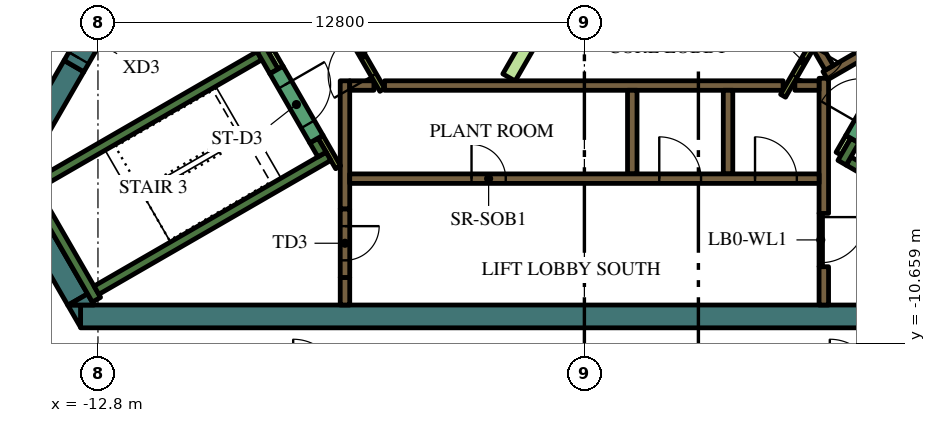
"""IFC4 building model, lengths in metres.
Left out: names, types, materials, properties, quantities, classifications, styles, units other than length and angle.
Written with IfcOpenShell. Run it as: python <this file> out.ifc"""

import sys

from ifc_helpers import new_model, si_unit, direction, frame, frame_2d, origin, place, context, subcontext, project, spatial, polyline, rectangle, outline, extrude, element, fill, save


model = new_model("IFC4")
c1 = context("Model", 3, precision=1e-05, world=origin(), true_north=direction((0.0, 1.0)))
c2 = subcontext(c1, "Body", "Model", "MODEL_VIEW")
j1 = project(units=[si_unit("LENGTHUNIT", "METRE"), si_unit("PLANEANGLEUNIT", "RADIAN")], contexts=[c1])
p1 = place(None, origin())
s1 = spatial("IfcSite", under=j1, at=p1, CompositionType="ELEMENT")
p2 = place(p1, origin())
s2 = spatial("IfcBuilding", under=s1, at=p2, CompositionType="ELEMENT")
p3 = place(p2, frame((0.0, 0.0, 336.0)))
s3 = spatial("IfcBuildingStorey", under=s2, at=p3, CompositionType="ELEMENT", Elevation=336.0)
p4 = place(p3, frame((8.904, -9.95, 0.0), z_axis=(0.0, 0.0, 1.0), x_axis=(-1.0, 0.0, 0.0)))
e1 = element("IfcWall", 1, at=p4, inside=s3, PredefinedType="SOLIDWALL", context=c2, shape_type="SweptSolid", body=[
    extrude(rectangle(XDim=22.161, YDim=0.6, at=frame_2d((11.081, 0.0))), origin(), (0.0, 0.0, 1.0), 4.2),
])
p5 = place(p3, origin())
e2 = element("IfcWall", 2, at=p5, inside=s3, PredefinedType="SOLIDWALL", context=c2, shape_type="SweptSolid", body=[
    extrude(outline(polyline([(-13.597, -9.65), (-13.259, -9.65), (-13.259, -10.236), (-13.597, -9.65)])), origin(), (0.0, 0.0, 1.0), 4.2),
])
p6 = place(p3, frame((-13.333, -9.506, 0.0), z_axis=(0.0, 0.0, 1.0), x_axis=(-0.500019073792, 0.866014391245, 0.0)))
e3 = element("IfcWall", 3, at=p6, inside=s3, PredefinedType="SOLIDWALL", context=c2, shape_type="SweptSolid", body=[
    extrude(rectangle(XDim=3.823, YDim=0.6, at=frame_2d((1.912, 0.0))), origin(), (0.0, 0.0, 1.0), 4.2),
])
e4 = element("IfcWall", 4, at=p5, inside=s3, PredefinedType="SOLIDWALL", context=c2, shape_type="SweptSolid", body=[
    extrude(outline(polyline([(-12.904, -9.65), (-13.58, -9.65), (-13.073, -9.357), (-12.904, -9.65)])), origin(), (0.0, 0.0, 1.0), 4.2),
])
p7 = place(p3, frame((-13.432, -3.364, 0.0), z_axis=(0.0, 0.0, 1.0), x_axis=(-0.499960127962, -0.866048422692, 0.0)))
e5 = element("IfcWall", 5, at=p7, inside=s3, PredefinedType="SOLIDWALL", context=c2, shape_type="SweptSolid", body=[
    extrude(rectangle(XDim=2.934, YDim=0.6, at=frame_2d((1.467, 0.0))), origin(), (0.0, 0.0, 1.0), 4.2),
])
p8 = place(p3, frame((12.84, -9.261, 0.0), z_axis=(0.0, 0.0, 1.0), x_axis=(-0.866013990052, 0.500019768644, 0.0)))
e6 = element("IfcWall", 6, at=p8, inside=s3, PredefinedType="SOLIDWALL", context=c2, shape_type="SweptSolid", body=[
    extrude(rectangle(XDim=6.8, YDim=0.25, at=frame_2d((3.4, 0.0))), origin(), (0.0, 0.0, 1.0), 4.2),
])
p9 = place(p3, frame((6.78, -5.906, 0.0), z_axis=(0.0, 0.0, 1.0), x_axis=(0.500223362819, 0.865896406789, 0.0)))
e7 = element("IfcWall", 7, at=p9, inside=s3, PredefinedType="SOLIDWALL", context=c2, shape_type="SweptSolid", body=[
    extrude(rectangle(XDim=0.675, YDim=0.25, at=frame_2d((0.337, 0.0))), origin(), (0.0, 0.0, 1.0), 4.2),
])
p10 = place(p3, frame((-12.84, -9.511, 0.0), z_axis=(0.0, 0.0, 1.0), x_axis=(-0.499997733992, 0.866026712061, 0.0)))
e8 = element("IfcWall", 8, at=p10, inside=s3, PredefinedType="SOLIDWALL", context=c2, shape_type="SweptSolid", body=[
    extrude(rectangle(XDim=3.634, YDim=0.25, at=frame_2d((1.817, 0.0))), origin(), (0.0, 0.0, 1.0), 4.2),
])
p11 = place(p3, frame((-14.44, -6.49, 0.0), z_axis=(0.0, 0.0, 1.0), x_axis=(0.866022966069, 0.500004222222, 0.0)))
e9 = element("IfcWall", 9, at=p11, inside=s3, PredefinedType="SOLIDWALL", context=c2, shape_type="SweptSolid", body=[
    extrude(rectangle(XDim=6.8, YDim=0.25, at=frame_2d((3.4, 0.0))), origin(), (0.0, 0.0, 1.0), 4.2),
])
p12 = place(p3, frame((-8.168, -3.503, 0.0), z_axis=(0.0, 0.0, 1.0), x_axis=(-0.499952099219, 0.866053057547, 0.0)))
e10 = element("IfcWall", 10, at=p12, inside=s3, PredefinedType="SOLIDWALL", context=c2, shape_type="SweptSolid", body=[
    extrude(rectangle(XDim=0.675, YDim=0.25, at=frame_2d((0.337, 0.0))), origin(), (0.0, 0.0, 1.0), 4.2),
])
p13 = place(p3, frame((-12.84, -9.261, 0.0), z_axis=(0.0, 0.0, 1.0), x_axis=(0.866016039709, 0.500016218704, 0.0)))
e11 = element("IfcWall", 11, at=p13, inside=s3, PredefinedType="SOLIDWALL", context=c2, shape_type="SweptSolid", body=[
    extrude(rectangle(XDim=7.05, YDim=0.25, at=frame_2d((3.525, 0.0))), origin(), (0.0, 0.0, 1.0), 4.2),
])
p14 = place(p3, frame((-6.905, -5.69, 0.0), z_axis=(0.0, 0.0, 1.0), x_axis=(-0.500402024738, 0.865793170242, 0.0)))
e12 = element("IfcWall", 12, at=p14, inside=s3, PredefinedType="SOLIDWALL", context=c2, shape_type="SweptSolid", body=[
    extrude(rectangle(XDim=0.425, YDim=0.25, at=frame_2d((0.212, 0.0))), origin(), (0.0, 0.0, 1.0), 4.2),
])
p15 = place(p3, frame((6.3, -7.24, 0.0), z_axis=(0.0, 0.0, 1.0), x_axis=(0.0, 1.0, 0.0)))
e13 = element("IfcWall", 13, at=p15, inside=s3, PredefinedType="SOLIDWALL", context=c2, shape_type="SweptSolid", body=[
    extrude(rectangle(XDim=3.556, YDim=0.25, at=frame_2d((1.778, 0.0))), origin(), (0.0, 0.0, 1.0), 4.2),
])
p16 = place(p3, frame((6.3, -9.65, 0.0), z_axis=(0.0, 0.0, 1.0), x_axis=(0.0, 1.0, 0.0)))
e14 = element("IfcWall", 14, at=p16, inside=s3, PredefinedType="SOLIDWALL", context=c2, shape_type="SweptSolid", body=[
    extrude(rectangle(XDim=1.008, YDim=0.25, at=frame_2d((0.504, 0.0))), origin(), (0.0, 0.0, 1.0), 4.2),
])
p17 = place(p3, frame((5.538, -3.875, 0.0), z_axis=(0.0, 0.0, 1.0), x_axis=(1.0, 0.0, 0.0)))
e15 = element("IfcWall", 15, at=p17, inside=s3, PredefinedType="SOLIDWALL", context=c2, shape_type="SweptSolid", body=[
    extrude(rectangle(XDim=0.637, YDim=0.25, at=frame_2d((0.318, 0.0))), origin(), (0.0, 0.0, 1.0), 4.2),
])
p18 = place(p3, frame((-5.259, -3.875, 0.0), z_axis=(0.0, 0.0, 1.0), x_axis=(1.0, 0.0, 0.0)))
e16 = element("IfcWall", 16, at=p18, inside=s3, PredefinedType="SOLIDWALL", context=c2, shape_type="SweptSolid", body=[
    extrude(rectangle(XDim=10.489, YDim=0.25, at=frame_2d((5.244, 0.0))), origin(), (0.0, 0.0, 1.0), 4.2),
])
for number, where, z_axis, x_axis in (
    (17, (1.26, -4.0, 0.0), (0.0, 0.0, 1.0), (0.0, -1.0, 0.0)),
    (18, (3.78, -4.0, 0.0), (0.0, 0.0, 1.0), (0.0, -1.0, 0.0)),
):
    element("IfcWall", number, at=place(p3, frame(where, z_axis=z_axis, x_axis=x_axis)), inside=s3, PredefinedType="SOLIDWALL", context=c2, shape_type="SweptSolid", body=[
        extrude(rectangle(XDim=2.2, YDim=0.25, at=frame_2d((1.1, 0.0))), origin(), (0.0, 0.0, 1.0), 4.2),
    ])
p19 = place(p3, frame((-6.3, -7.125, 0.0), z_axis=(0.0, 0.0, 1.0), x_axis=(0.0, 1.0, 0.0)))
e19 = element("IfcWall", 19, at=p19, inside=s3, PredefinedType="SOLIDWALL", context=c2, shape_type="SweptSolid", body=[
    extrude(rectangle(XDim=3.375, YDim=0.25, at=frame_2d((1.687, 0.0))), origin(), (0.0, 0.0, 1.0), 4.2),
])
p20 = place(p3, frame((-6.175, -3.875, 0.0), z_axis=(0.0, 0.0, 1.0), x_axis=(1.0, 0.0, 0.0)))
e20 = element("IfcWall", 20, at=p20, inside=s3, PredefinedType="SOLIDWALL", context=c2, shape_type="SweptSolid", body=[
    extrude(rectangle(XDim=0.637, YDim=0.25, at=frame_2d((0.318, 0.0))), origin(), (0.0, 0.0, 1.0), 4.2),
])
p21 = place(p3, frame((-6.3, -8.925, 0.0), z_axis=(0.0, 0.0, 1.0), x_axis=(0.0, -1.0, 0.0)))
e21 = element("IfcWall", 21, at=p21, inside=s3, PredefinedType="SOLIDWALL", context=c2, shape_type="SweptSolid", body=[
    extrude(rectangle(XDim=0.725, YDim=0.25, at=frame_2d((0.363, 0.0))), origin(), (0.0, 0.0, 1.0), 4.2),
])
p22 = place(p3, frame((9.19, -1.969, 0.0), z_axis=(0.0, 0.0, 1.0), x_axis=(-0.866057109641, -0.499945079824, 0.0)))
e22 = element("IfcWall", 22, at=p22, inside=s3, PredefinedType="SOLIDWALL", context=c2, shape_type="SweptSolid", body=[
    extrude(rectangle(XDim=3.291, YDim=0.25, at=frame_2d((1.646, 0.0))), origin(), (0.0, 0.0, 1.0), 4.2),
])
p23 = place(p3, frame((6.13, -2.867, 0.0), z_axis=(0.0, 0.0, 1.0), x_axis=(0.500160776593, -0.865932559475, 0.0)))
e23 = element("IfcWall", 23, at=p23, inside=s3, PredefinedType="SOLIDWALL", context=c2, shape_type="SweptSolid", body=[
    extrude(rectangle(XDim=0.627, YDim=0.25, at=frame_2d((0.313, 0.0))), origin(), (0.0, 0.0, 1.0), 4.2),
])
p24 = place(p3, frame((-8.252, -2.958, 0.0), z_axis=(0.0, 0.0, 1.0), x_axis=(0.500174715838, -0.865924508047, 0.0)))
e24 = element("IfcWall", 24, at=p24, inside=s3, PredefinedType="PARTITIONING", context=c2, shape_type="SweptSolid", body=[
    extrude(rectangle(XDim=0.514, YDim=0.15, at=frame_2d((0.257, 0.0))), origin(), (0.0, 0.0, 1.0), 3.45),
])
p25 = place(p3, frame((-6.48, -6.027, 0.0), z_axis=(0.0, 0.0, 1.0), x_axis=(-0.499927229454, 0.866067413802, 0.0)))
e25 = element("IfcWall", 25, at=p25, inside=s3, PredefinedType="PARTITIONING", context=c2, shape_type="SweptSolid", body=[
    extrude(rectangle(XDim=0.929, YDim=0.15, at=frame_2d((0.464, 0.0))), origin(), (0.0, 0.0, 1.0), 4.2),
])
p26 = place(p3, frame((6.945, -5.222, 0.0), z_axis=(0.0, 0.0, 1.0), x_axis=(-0.499818422106, -0.866130212453, 0.0)))
e26 = element("IfcWall", 26, at=p26, inside=s3, PredefinedType="PARTITIONING", context=c2, shape_type="SweptSolid", body=[
    extrude(rectangle(XDim=0.514, YDim=0.15, at=frame_2d((0.257, 0.0))), origin(), (0.0, 0.0, 1.0), 3.45),
])
e27 = element("IfcWall", 27, at=p5, inside=s3, PredefinedType="PARTITIONING", context=c2, shape_type="SweptSolid", body=[
    extrude(outline(polyline([(2.017, 3.643), (2.342, 3.456), (-1.822, -3.756), (-2.147, -3.568), (2.017, 3.643)])), origin(), (0.0, 0.0, 1.0), 3.45),
])
p27 = place(p3, frame((-6.175, -6.325, 0.0), z_axis=(0.0, 0.0, 1.0), x_axis=(1.0, 0.0, 0.0)))
e28 = element("IfcWall", 28, at=p27, inside=s3, PredefinedType="SOLIDWALL", context=c2, shape_type="SweptSolid", body=[
    extrude(rectangle(XDim=12.35, YDim=0.25, at=frame_2d((6.175, 0.0))), origin(), (0.0, 0.0, 1.0), 4.2),
])
p28 = place(p27, frame((3.205, 0.0, 0.0)))
e29 = element("IfcOpeningElement", 29, at=p28, cuts=e28, PredefinedType="OPENING", context=c2, shape_type="SweptSolid", body=[
    extrude(rectangle(XDim=0.9, YDim=2.1, at=frame_2d((0.45, 1.05))), frame((0.0, 0.135, 0.0), z_axis=(0.0, -1.0, 0.0), x_axis=(1.0, 0.0, 0.0)), (0.0, 0.0, 1.0), 0.27),
])
p29 = place(p27, frame((8.145, 0.0, 0.0)))
e30 = element("IfcOpeningElement", 30, at=p29, cuts=e28, PredefinedType="OPENING", context=c2, shape_type="SweptSolid", body=[
    extrude(rectangle(XDim=1.1, YDim=2.1, at=frame_2d((0.55, 1.05))), frame((0.0, 0.135, 0.0), z_axis=(0.0, -1.0, 0.0), x_axis=(1.0, 0.0, 0.0)), (0.0, 0.0, 1.0), 0.27),
])
p30 = place(p27, frame((10.665, 0.0, 0.0)))
e31 = element("IfcOpeningElement", 31, at=p30, cuts=e28, PredefinedType="OPENING", context=c2, shape_type="SweptSolid", body=[
    extrude(rectangle(XDim=1.1, YDim=2.1, at=frame_2d((0.55, 1.05))), frame((0.0, 0.135, 0.0), z_axis=(0.0, -1.0, 0.0), x_axis=(1.0, 0.0, 0.0)), (0.0, 0.0, 1.0), 0.27),
])
p31 = place(p3, frame((7.053, -5.284, 0.0), z_axis=(0.0, 0.0, 1.0), x_axis=(0.500078061341, 0.865980330357, 0.0)))
e32 = element("IfcWall", 32, at=p31, inside=s3, PredefinedType="SOLIDWALL", context=c2, shape_type="SweptSolid", body=[
    extrude(rectangle(XDim=2.1, YDim=0.4, at=frame_2d((1.05, 0.0))), origin(), (0.0, 0.0, 1.0), 4.2),
])
p32 = place(p31, frame((0.45, 0.0, 0.0)))
e33 = element("IfcOpeningElement", 33, at=p32, cuts=e32, PredefinedType="OPENING", context=c2, shape_type="SweptSolid", body=[
    extrude(rectangle(XDim=1.2, YDim=2.1, at=frame_2d((0.6, 1.05))), frame((0.0, 0.21, 0.0), z_axis=(0.0, -1.0, 0.0), x_axis=(1.0, 0.0, 0.0)), (0.0, 0.0, 1.0), 0.42),
])
p33 = place(p3, frame((-8.103, -3.466, 0.0), z_axis=(0.0, 0.0, 1.0), x_axis=(0.500078061341, -0.865980330357, 0.0)))
e34 = element("IfcWall", 34, at=p33, inside=s3, PredefinedType="SOLIDWALL", context=c2, shape_type="SweptSolid", body=[
    extrude(rectangle(XDim=2.1, YDim=0.4, at=frame_2d((1.05, 0.0))), origin(), (0.0, 0.0, 1.0), 4.2),
])
p34 = place(p33, frame((0.45, 0.0, 0.0)))
e35 = element("IfcOpeningElement", 35, at=p34, cuts=e34, PredefinedType="OPENING", context=c2, shape_type="SweptSolid", body=[
    extrude(rectangle(XDim=1.2, YDim=2.1, at=frame_2d((0.6, 1.05))), frame((0.0, 0.21, 0.0), z_axis=(0.0, -1.0, 0.0), x_axis=(1.0, 0.0, 0.0)), (0.0, 0.0, 1.0), 0.42),
])
p35 = place(p3, frame((-6.3, -7.125, 0.0), z_axis=(0.0, 0.0, 1.0), x_axis=(0.0, -1.0, 0.0)))
e36 = element("IfcWall", 36, at=p35, inside=s3, PredefinedType="SOLIDWALL", context=c2, shape_type="SweptSolid", body=[
    extrude(rectangle(XDim=1.8, YDim=0.25, at=frame_2d((0.9, 0.0))), origin(), (0.0, 0.0, 1.0), 4.2),
])
p36 = place(p35, frame((0.45, 0.0, 0.0)))
e37 = element("IfcOpeningElement", 37, at=p36, cuts=e36, PredefinedType="OPENING", context=c2, shape_type="SweptSolid", body=[
    extrude(rectangle(XDim=0.9, YDim=2.1, at=frame_2d((0.45, 1.05))), frame((0.0, 0.135, 0.0), z_axis=(0.0, -1.0, 0.0), x_axis=(1.0, 0.0, 0.0)), (0.0, 0.0, 1.0), 0.27),
])
p37 = place(p3, frame((6.203, -2.456, 0.0), z_axis=(0.0, 0.0, 1.0), x_axis=(-0.500043961785, -0.866000020948, 0.0)))
e38 = element("IfcWall", 38, at=p37, inside=s3, PredefinedType="PARTITIONING", context=c2, shape_type="SweptSolid", body=[
    extrude(rectangle(XDim=1.95, YDim=0.15, at=frame_2d((0.975, 0.0))), origin(), (0.0, 0.0, 1.0), 4.2),
])
p38 = place(p37, frame((0.45, 0.0, 0.0)))
e39 = element("IfcOpeningElement", 39, at=p38, cuts=e38, PredefinedType="OPENING", context=c2, shape_type="SweptSolid", body=[
    extrude(rectangle(XDim=0.9, YDim=2.1, at=frame_2d((0.45, 1.05))), frame((0.0, 0.085, 0.0), z_axis=(0.0, -1.0, 0.0), x_axis=(1.0, 0.0, 0.0)), (0.0, 0.0, 1.0), 0.17),
])
p39 = place(p3, frame((-5.317, -3.99, 0.0), z_axis=(0.0, 0.0, 1.0), x_axis=(-0.500027713859, 0.866009402589, 0.0)))
e40 = element("IfcWall", 40, at=p39, inside=s3, PredefinedType="PARTITIONING", context=c2, shape_type="SweptSolid", body=[
    extrude(rectangle(XDim=2.1, YDim=0.15, at=frame_2d((1.05, 0.0))), origin(), (0.0, 0.0, 1.0), 4.2),
])
p40 = place(p39, frame((0.45, 0.0, 0.0)))
e41 = element("IfcOpeningElement", 41, at=p40, cuts=e40, PredefinedType="OPENING", context=c2, shape_type="SweptSolid", body=[
    extrude(rectangle(XDim=1.2, YDim=2.1, at=frame_2d((0.6, 1.05))), frame((0.0, 0.085, 0.0), z_axis=(0.0, -1.0, 0.0), x_axis=(1.0, 0.0, 0.0)), (0.0, 0.0, 1.0), 0.17),
])
p41 = place(p3, frame((6.22, -7.237, 0.0), z_axis=(0.0, 0.0, 1.0), x_axis=(0.0, -1.0, 0.0)))
e42 = element("IfcWall", 42, at=p41, inside=s3, PredefinedType="PARTITIONING", context=c2, shape_type="SweptSolid", body=[
    extrude(rectangle(XDim=1.4, YDim=0.09, at=frame_2d((0.7, 0.0))), origin(), (0.0, 0.0, 1.0), 3.45),
])
p42 = place(p41, frame((0.1, 0.0, 0.0)))
e43 = element("IfcOpeningElement", 43, at=p42, cuts=e42, PredefinedType="OPENING", context=c2, shape_type="SweptSolid", body=[
    extrude(rectangle(XDim=1.2, YDim=2.1, at=frame_2d((0.6, 1.05))), frame((0.0, 0.055, 0.0), z_axis=(0.0, -1.0, 0.0), x_axis=(1.0, 0.0, 0.0)), (0.0, 0.0, 1.0), 0.11),
])
p43 = place(p3, frame((-13.432, -3.364, 0.0), z_axis=(0.0, 0.0, 1.0), x_axis=(0.500000056704, 0.866025371046, 0.0)))
e44 = element("IfcWall", 44, at=p43, inside=s3, PredefinedType="SOLIDWALL", context=c2, shape_type="SweptSolid", body=[
    extrude(rectangle(XDim=1.7, YDim=0.6, at=frame_2d((0.85, 0.0))), origin(), (0.0, 0.0, 1.0), 4.2),
])
p44 = place(p43, frame((0.25, 0.0, 0.0)))
e45 = element("IfcOpeningElement", 45, at=p44, cuts=e44, PredefinedType="OPENING", context=c2, shape_type="SweptSolid", body=[
    extrude(rectangle(XDim=1.2, YDim=2.1, at=frame_2d((0.6, 1.05))), frame((0.0, 0.31, 0.0), z_axis=(0.0, -1.0, 0.0), x_axis=(1.0, 0.0, 0.0)), (0.0, 0.0, 1.0), 0.62),
])
p45 = place(p3, frame((-10.176, 5.875, 0.0), z_axis=(0.0, 0.0, 1.0), x_axis=(-0.499989432091, -0.866031505083, 0.0)))
e46 = element("IfcWall", 46, at=p45, inside=s3, PredefinedType="PARTITIONING", context=c2, shape_type="SweptSolid", body=[
    extrude(rectangle(XDim=14.116, YDim=0.2, at=frame_2d((7.058, 0.0))), origin(), (0.0, 0.0, 1.0), 3.45),
])
p46 = place(p45, frame((6.458, 0.0, 0.0)))
e47 = element("IfcOpeningElement", 47, at=p46, cuts=e46, PredefinedType="OPENING", context=c2, shape_type="SweptSolid", body=[
    extrude(rectangle(XDim=1.2, YDim=2.1, at=frame_2d((0.6, 1.05))), frame((0.0, 0.11, 0.0), z_axis=(0.0, -1.0, 0.0), x_axis=(1.0, 0.0, 0.0)), (0.0, 0.0, 1.0), 0.22),
])
p47 = place(p28, origin())
e48 = element("IfcDoor", 48, at=p47, inside=s3, OperationType="SINGLE_SWING_LEFT", PredefinedType="DOOR", context=c2, shape_type="SweptSolid", body=[
    extrude(rectangle(XDim=0.9, YDim=2.1, at=frame_2d((0.45, 1.05))), frame((0.0, 0.025, 0.0), z_axis=(0.0, -1.0, 0.0), x_axis=(1.0, 0.0, 0.0)), (0.0, 0.0, 1.0), 0.05),
])
fill(e29, e48)
p48 = place(p29, origin())
e49 = element("IfcDoor", 49, at=p48, inside=s3, OperationType="DOUBLE_DOOR_SLIDING", PredefinedType="DOOR", context=c2, shape_type="SweptSolid", body=[
    extrude(rectangle(XDim=1.1, YDim=2.1, at=frame_2d((0.55, 1.05))), frame((0.0, 0.025, 0.0), z_axis=(0.0, -1.0, 0.0), x_axis=(1.0, 0.0, 0.0)), (0.0, 0.0, 1.0), 0.05),
])
fill(e30, e49)
p49 = place(p30, origin())
e50 = element("IfcDoor", 50, at=p49, inside=s3, OperationType="DOUBLE_DOOR_SLIDING", PredefinedType="DOOR", context=c2, shape_type="SweptSolid", body=[
    extrude(rectangle(XDim=1.1, YDim=2.1, at=frame_2d((0.55, 1.05))), frame((0.0, 0.025, 0.0), z_axis=(0.0, -1.0, 0.0), x_axis=(1.0, 0.0, 0.0)), (0.0, 0.0, 1.0), 0.05),
])
fill(e31, e50)
p50 = place(p34, origin())
e51 = element("IfcDoor", 51, at=p50, inside=s3, OperationType="SINGLE_SWING_LEFT", PredefinedType="DOOR", context=c2, shape_type="SweptSolid", body=[
    extrude(rectangle(XDim=1.2, YDim=2.1, at=frame_2d((0.6, 1.05))), frame((0.0, 0.025, 0.0), z_axis=(0.0, -1.0, 0.0), x_axis=(1.0, 0.0, 0.0)), (0.0, 0.0, 1.0), 0.05),
])
fill(e35, e51)
p51 = place(p36, origin())
e52 = element("IfcDoor", 52, at=p51, inside=s3, OperationType="SINGLE_SWING_LEFT", PredefinedType="DOOR", context=c2, shape_type="SweptSolid", body=[
    extrude(rectangle(XDim=0.9, YDim=2.1, at=frame_2d((0.45, 1.05))), frame((0.0, 0.025, 0.0), z_axis=(0.0, -1.0, 0.0), x_axis=(1.0, 0.0, 0.0)), (0.0, 0.0, 1.0), 0.05),
])
fill(e37, e52)
p52 = place(p38, origin())
e53 = element("IfcDoor", 53, at=p52, inside=s3, OperationType="SINGLE_SWING_LEFT", PredefinedType="DOOR", context=c2, shape_type="SweptSolid", body=[
    extrude(rectangle(XDim=0.9, YDim=2.1, at=frame_2d((0.45, 1.05))), frame((0.0, 0.025, 0.0), z_axis=(0.0, -1.0, 0.0), x_axis=(1.0, 0.0, 0.0)), (0.0, 0.0, 1.0), 0.05),
])
fill(e39, e53)
p53 = place(p40, origin())
e54 = element("IfcDoor", 54, at=p53, inside=s3, OperationType="SINGLE_SWING_LEFT", PredefinedType="DOOR", context=c2, shape_type="SweptSolid", body=[
    extrude(rectangle(XDim=1.2, YDim=2.1, at=frame_2d((0.6, 1.05))), frame((0.0, 0.025, 0.0), z_axis=(0.0, -1.0, 0.0), x_axis=(1.0, 0.0, 0.0)), (0.0, 0.0, 1.0), 0.05),
])
fill(e41, e54)
p54 = place(p42, origin())
e55 = element("IfcDoor", 55, at=p54, inside=s3, OperationType="SINGLE_SWING_LEFT", PredefinedType="DOOR", context=c2, shape_type="SweptSolid", body=[
    extrude(rectangle(XDim=1.2, YDim=2.1, at=frame_2d((0.6, 1.05))), frame((0.0, 0.025, 0.0), z_axis=(0.0, -1.0, 0.0), x_axis=(1.0, 0.0, 0.0)), (0.0, 0.0, 1.0), 0.05),
])
fill(e43, e55)
p55 = place(p44, origin())
e56 = element("IfcDoor", 56, at=p55, inside=s3, OperationType="SINGLE_SWING_LEFT", PredefinedType="DOOR", context=c2, shape_type="SweptSolid", body=[
    extrude(rectangle(XDim=1.2, YDim=2.1, at=frame_2d((0.6, 1.05))), frame((0.0, 0.025, 0.0), z_axis=(0.0, -1.0, 0.0), x_axis=(1.0, 0.0, 0.0)), (0.0, 0.0, 1.0), 0.05),
])
fill(e45, e56)
save(model, sys.argv[1])
